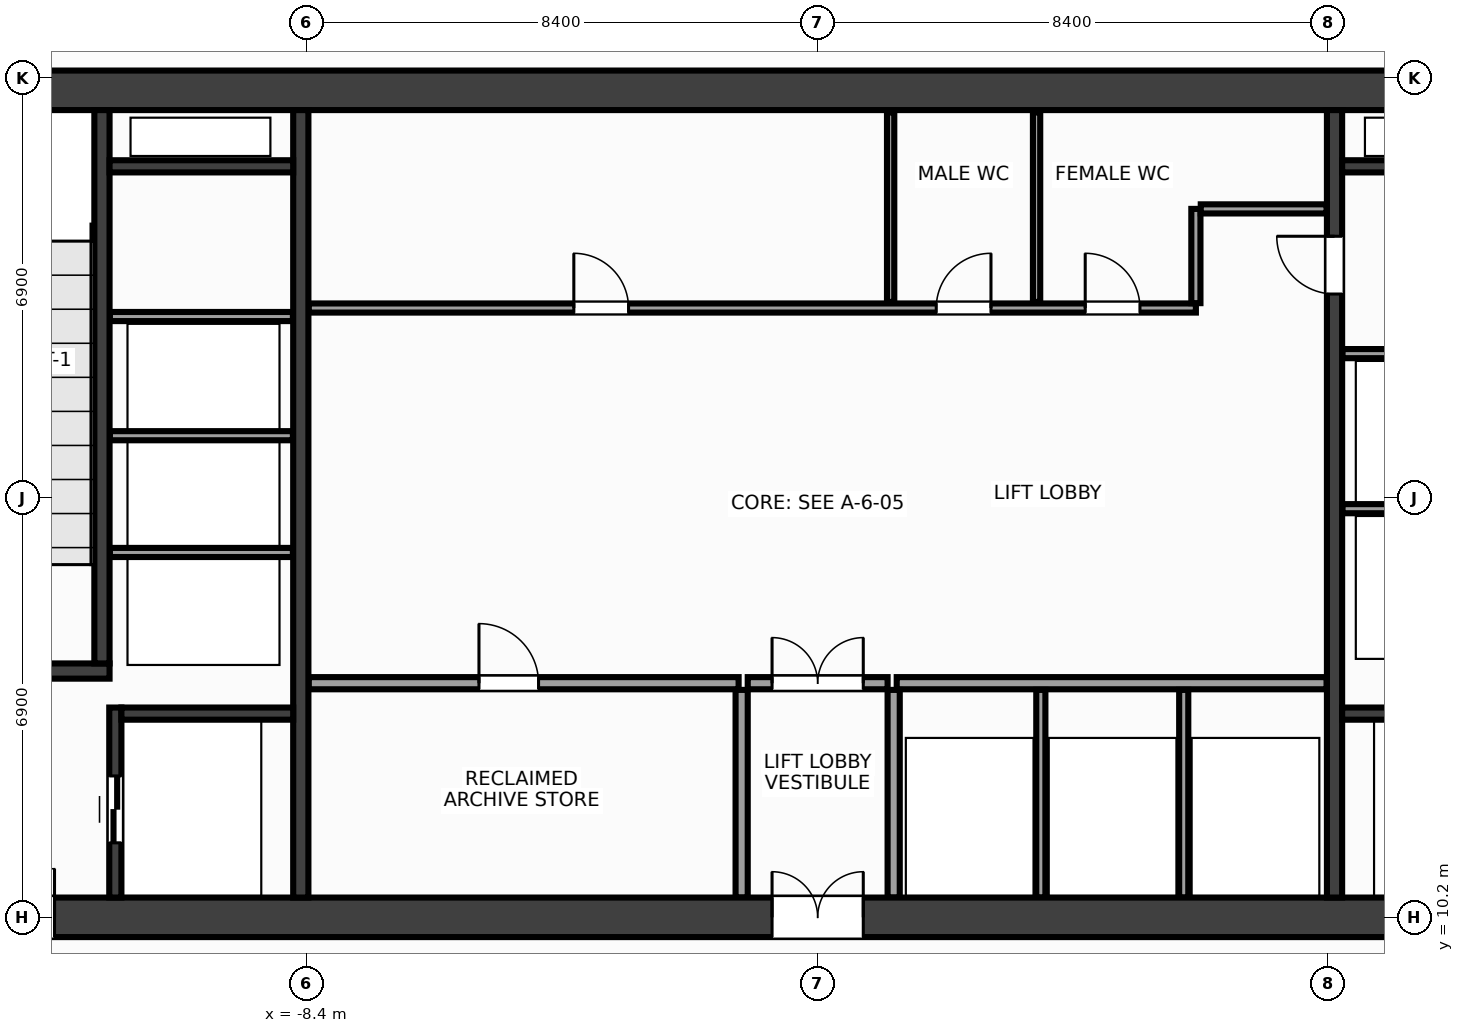
"""IFC4 building model, lengths in metres.
Left out: names, types, materials, properties, quantities, classifications, styles, units other than length and angle.
Written with IfcOpenShell. Run it as: python <this file> out.ifc"""

import sys

from ifc_helpers import new_model, si_unit, direction, frame, frame_2d, origin, place, context, subcontext, project, spatial, rectangle, extrude, source, transform, mapped, element, fill, save


model = new_model("IFC4")
c1 = context("Model", 3, precision=1e-05, world=origin(), true_north=direction((0.0, 1.0)))
c2 = subcontext(c1, "Body", "Model", "MODEL_VIEW")
j1 = project(units=[si_unit("LENGTHUNIT", "METRE"), si_unit("PLANEANGLEUNIT", "RADIAN")], contexts=[c1])
p1 = place(None, origin())
s1 = spatial("IfcSite", under=j1, at=p1, CompositionType="ELEMENT")
p2 = place(p1, origin())
s2 = spatial("IfcBuilding", under=s1, at=p2, CompositionType="ELEMENT")
p3 = place(p2, frame((0.0, 0.0, 189.2)))
s3 = spatial("IfcBuildingStorey", under=s2, at=p3, CompositionType="ELEMENT", Elevation=189.2)
m1 = source(origin(), c2, "Body", "SweptSolid", [
    extrude(rectangle(XDim=31.85, YDim=0.65, at=frame_2d((15.925, 0.0))), origin(), (0.0, 0.0, 1.0), 7.2),
])
p4 = place(p3, frame((-15.925, 23.8, 0.0), z_axis=(0.0, 0.0, 1.0), x_axis=(1.0, 0.0, 0.0)))
e1 = element("IfcWall", 1, at=p4, inside=s3, PredefinedType="SHEAR", context=c2, shape_type="MappedRepresentation", body=[
    mapped(m1, transform((0.0, 0.0, 0.0), x_axis=(1.0, 0.0, 0.0), y_axis=(0.0, 1.0, 0.0), z_axis=(0.0, 0.0, 1.0), scale=1.0)),
])
p5 = place(p3, frame((-15.925, 10.2, 0.0), z_axis=(0.0, 0.0, 1.0), x_axis=(1.0, 0.0, 0.0)))
e2 = element("IfcWall", 2, at=p5, inside=s3, PredefinedType="SHEAR", context=c2, shape_type="MappedRepresentation", body=[
    mapped(m1, transform((0.0, 0.0, 0.0), x_axis=(1.0, 0.0, 0.0), y_axis=(0.0, 1.0, 0.0), z_axis=(0.0, 0.0, 1.0), scale=1.0)),
])
p6 = place(p5, frame((1.775, 0.0, 0.0)))
e3 = element("IfcOpeningElement", 3, at=p6, cuts=e2, PredefinedType="OPENING", context=c2, shape_type="SweptSolid", body=[
    extrude(rectangle(XDim=1.6, YDim=2.15, at=frame_2d((0.8, 1.075))), frame((0.0, 0.337, 0.0), z_axis=(0.0, -1.0, 0.0), x_axis=(1.0, 0.0, 0.0)), (0.0, 0.0, 1.0), 0.674),
])
p7 = place(p5, frame((28.475, 0.0, 0.0)))
e4 = element("IfcOpeningElement", 4, at=p7, cuts=e2, PredefinedType="OPENING", context=c2, shape_type="SweptSolid", body=[
    extrude(rectangle(XDim=1.6, YDim=2.15, at=frame_2d((0.8, 1.075))), frame((0.0, 0.337, 0.0), z_axis=(0.0, -1.0, 0.0), x_axis=(1.0, 0.0, 0.0)), (0.0, 0.0, 1.0), 0.674),
])
p8 = place(p5, frame((15.175, 0.0, 0.0)))
e5 = element("IfcOpeningElement", 5, at=p8, cuts=e2, PredefinedType="OPENING", context=c2, shape_type="SweptSolid", body=[
    extrude(rectangle(XDim=1.5, YDim=2.2, at=frame_2d((0.75, 1.1))), frame((0.0, 0.337, 0.0), z_axis=(0.0, -1.0, 0.0), x_axis=(1.0, 0.0, 0.0)), (0.0, 0.0, 1.0), 0.674),
])
m2 = source(origin(), c2, "Body", "SweptSolid", [
    extrude(rectangle(XDim=12.95, YDim=0.25, at=frame_2d((6.475, 0.0))), origin(), (0.0, 0.0, 1.0), 7.2),
])
p9 = place(p3, frame((-8.5, 10.525, 0.0), z_axis=(0.0, 0.0, 1.0), x_axis=(0.0, 1.0, 0.0)))
e6 = element("IfcWall", 6, at=p9, inside=s3, PredefinedType="SHEAR", context=c2, shape_type="MappedRepresentation", body=[
    mapped(m2, transform((0.0, 0.0, 0.0), x_axis=(1.0, 0.0, 0.0), y_axis=(0.0, 1.0, 0.0), z_axis=(0.0, 0.0, 1.0), scale=1.0)),
])
p10 = place(p3, frame((8.5, 10.525, 0.0), z_axis=(0.0, 0.0, 1.0), x_axis=(0.0, 1.0, 0.0)))
e7 = element("IfcWall", 7, at=p10, inside=s3, PredefinedType="SHEAR", context=c2, shape_type="MappedRepresentation", body=[
    mapped(m2, transform((0.0, 0.0, 0.0), x_axis=(1.0, 0.0, 0.0), y_axis=(0.0, 1.0, 0.0), z_axis=(0.0, 0.0, 1.0), scale=1.0)),
])
p11 = place(p10, frame((9.925, 0.0, 0.0)))
e8 = element("IfcOpeningElement", 8, at=p11, cuts=e7, PredefinedType="OPENING", context=c2, shape_type="SweptSolid", body=[
    extrude(rectangle(XDim=0.95, YDim=2.15, at=frame_2d((0.475, 1.075))), frame((0.0, 0.137, 0.0), z_axis=(0.0, -1.0, 0.0), x_axis=(1.0, 0.0, 0.0)), (0.0, 0.0, 1.0), 0.274),
])
m3 = source(origin(), c2, "Body", "SweptSolid", [
    extrude(rectangle(XDim=3.63, YDim=0.25, at=frame_2d((1.815, 0.0))), origin(), (0.0, 0.0, 1.0), 7.2),
])
p12 = place(p3, frame((-15.275, 14.25, 0.0), z_axis=(0.0, 0.0, 1.0), x_axis=(1.0, 0.0, 0.0)))
e9 = element("IfcWall", 9, at=p12, inside=s3, PredefinedType="SHEAR", context=c2, shape_type="MappedRepresentation", body=[
    mapped(m3, transform((0.0, 0.0, 0.0), x_axis=(1.0, 0.0, 0.0), y_axis=(0.0, 1.0, 0.0), z_axis=(0.0, 0.0, 1.0), scale=1.0)),
])
p13 = place(p12, frame((0.95, 0.0, 0.0)))
e10 = element("IfcOpeningElement", 10, at=p13, cuts=e9, PredefinedType="OPENING", context=c2, shape_type="SweptSolid", body=[
    extrude(rectangle(XDim=1.6, YDim=2.15, at=frame_2d((0.8, 1.075))), frame((0.0, 0.137, 0.0), z_axis=(0.0, -1.0, 0.0), x_axis=(1.0, 0.0, 0.0)), (0.0, 0.0, 1.0), 0.274),
])
m4 = source(origin(), c2, "Body", "SweptSolid", [
    extrude(rectangle(XDim=9.1, YDim=0.25, at=frame_2d((4.55, 0.0))), origin(), (0.0, 0.0, 1.0), 7.2),
])
p14 = place(p3, frame((-11.77, 14.375, 0.0), z_axis=(0.0, 0.0, 1.0), x_axis=(0.0, 1.0, 0.0)))
e11 = element("IfcWall", 11, at=p14, inside=s3, PredefinedType="SHEAR", context=c2, shape_type="MappedRepresentation", body=[
    mapped(m4, transform((0.0, 0.0, 0.0), x_axis=(1.0, 0.0, 0.0), y_axis=(0.0, 1.0, 0.0), z_axis=(0.0, 0.0, 1.0), scale=1.0)),
])
m5 = source(origin(), c2, "Body", "SweptSolid", [
    extrude(rectangle(XDim=3.125, YDim=0.2, at=frame_2d((1.562, 0.0))), origin(), (0.0, 0.0, 1.0), 7.2),
])
p15 = place(p3, frame((-11.55, 10.525, 0.0), z_axis=(0.0, 0.0, 1.0), x_axis=(0.0, 1.0, 0.0)))
e12 = element("IfcWall", 12, at=p15, inside=s3, PredefinedType="SHEAR", context=c2, shape_type="MappedRepresentation", body=[
    mapped(m5, transform((0.0, 0.0, 0.0), x_axis=(1.0, 0.0, 0.0), y_axis=(0.0, 1.0, 0.0), z_axis=(0.0, 0.0, 1.0), scale=1.0)),
])
p16 = place(p15, frame((0.9, 0.0, 0.0)))
e13 = element("IfcOpeningElement", 13, at=p16, cuts=e12, PredefinedType="OPENING", context=c2, shape_type="SweptSolid", body=[
    extrude(rectangle(XDim=1.1, YDim=2.15, at=frame_2d((0.55, 1.075))), frame((0.0, 0.112, 0.0), z_axis=(0.0, -1.0, 0.0), x_axis=(1.0, 0.0, 0.0)), (0.0, 0.0, 1.0), 0.224),
])
m6 = source(origin(), c2, "Body", "SweptSolid", [
    extrude(rectangle(XDim=2.825, YDim=0.2, at=frame_2d((1.413, 0.0))), origin(), (0.0, 0.0, 1.0), 7.2),
])
for number, where, z_axis, x_axis in (
    (14, (-11.45, 13.55, 0.0), (0.0, 0.0, 1.0), (1.0, 0.0, 0.0)),
    (15, (8.625, 13.55, 0.0), (0.0, 0.0, 1.0), (1.0, 0.0, 0.0)),
):
    element("IfcWall", number, at=place(p3, frame(where, z_axis=z_axis, x_axis=x_axis)), inside=s3, PredefinedType="SHEAR", context=c2, shape_type="MappedRepresentation", body=[
        mapped(m6, transform((0.0, 0.0, 0.0), x_axis=(1.0, 0.0, 0.0), y_axis=(0.0, 1.0, 0.0), z_axis=(0.0, 0.0, 1.0), scale=1.0)),
    ])
m7 = source(origin(), c2, "Body", "SweptSolid", [
    extrude(rectangle(XDim=3.02, YDim=0.2, at=frame_2d((1.51, 0.0))), origin(), (0.0, 0.0, 1.0), 7.2),
])
for number, where, z_axis, x_axis in (
    (16, (-11.645, 22.55, 0.0), (0.0, 0.0, 1.0), (1.0, 0.0, 0.0)),
    (17, (8.625, 22.55, 0.0), (0.0, 0.0, 1.0), (1.0, 0.0, 0.0)),
):
    element("IfcWall", number, at=place(p3, frame(where, z_axis=z_axis, x_axis=x_axis)), inside=s3, PredefinedType="SHEAR", context=c2, shape_type="MappedRepresentation", body=[
        mapped(m7, transform((0.0, 0.0, 0.0), x_axis=(1.0, 0.0, 0.0), y_axis=(0.0, 1.0, 0.0), z_axis=(0.0, 0.0, 1.0), scale=1.0)),
    ])
m8 = source(origin(), c2, "Body", "SweptSolid", [
    extrude(rectangle(XDim=3.01, YDim=0.15, at=frame_2d((1.505, 0.0))), origin(), (0.0, 0.0, 1.0), 6.9),
])
for number, where, z_axis, x_axis in (
    (18, (-11.64, 16.2, 0.0), (0.0, 0.0, 1.0), (1.0, 0.0, 0.0)),
    (19, (-11.64, 18.12, 0.0), (0.0, 0.0, 1.0), (1.0, 0.0, 0.0)),
    (20, (-11.64, 20.08, 0.0), (0.0, 0.0, 1.0), (1.0, 0.0, 0.0)),
    (21, (8.63, 16.92, 0.0), (0.0, 0.0, 1.0), (1.0, 0.0, 0.0)),
    (22, (8.63, 19.47, 0.0), (0.0, 0.0, 1.0), (1.0, 0.0, 0.0)),
):
    element("IfcWall", number, at=place(p3, frame(where, z_axis=z_axis, x_axis=x_axis)), inside=s3, PredefinedType="PARTITIONING", context=c2, shape_type="MappedRepresentation", body=[
        mapped(m8, transform((0.0, 0.0, 0.0), x_axis=(1.0, 0.0, 0.0), y_axis=(0.0, 1.0, 0.0), z_axis=(0.0, 0.0, 1.0), scale=1.0)),
    ])
m9 = source(origin(), c2, "Body", "SweptSolid", [
    extrude(rectangle(XDim=7.07, YDim=0.2, at=frame_2d((3.535, 0.0))), origin(), (0.0, 0.0, 1.0), 6.9),
])
p17 = place(p3, frame((-8.37, 14.05, 0.0), z_axis=(0.0, 0.0, 1.0), x_axis=(1.0, 0.0, 0.0)))
e23 = element("IfcWall", 23, at=p17, inside=s3, PredefinedType="PARTITIONING", context=c2, shape_type="MappedRepresentation", body=[
    mapped(m9, transform((0.0, 0.0, 0.0), x_axis=(1.0, 0.0, 0.0), y_axis=(0.0, 1.0, 0.0), z_axis=(0.0, 0.0, 1.0), scale=1.0)),
])
p18 = place(p17, frame((2.8, 0.0, 0.0)))
e24 = element("IfcOpeningElement", 24, at=p18, cuts=e23, PredefinedType="OPENING", context=c2, shape_type="SweptSolid", body=[
    extrude(rectangle(XDim=0.98, YDim=2.15, at=frame_2d((0.49, 1.075))), frame((0.0, 0.112, 0.0), z_axis=(0.0, -1.0, 0.0), x_axis=(1.0, 0.0, 0.0)), (0.0, 0.0, 1.0), 0.224),
])
p19 = place(p3, frame((1.3, 14.05, 0.0), z_axis=(0.0, 0.0, 1.0), x_axis=(1.0, 0.0, 0.0)))
e25 = element("IfcWall", 25, at=p19, inside=s3, PredefinedType="PARTITIONING", context=c2, shape_type="MappedRepresentation", body=[
    mapped(m9, transform((0.0, 0.0, 0.0), x_axis=(1.0, 0.0, 0.0), y_axis=(0.0, 1.0, 0.0), z_axis=(0.0, 0.0, 1.0), scale=1.0)),
])
m10 = source(origin(), c2, "Body", "SweptSolid", [
    extrude(rectangle(XDim=3.415, YDim=0.2, at=frame_2d((1.708, 0.0))), origin(), (0.0, 0.0, 1.0), 6.9),
])
for number, where, z_axis, x_axis in (
    (26, (-1.25, 10.525, 0.0), (0.0, 0.0, 1.0), (0.0, 1.0, 0.0)),
    (27, (1.25, 10.525, 0.0), (0.0, 0.0, 1.0), (0.0, 1.0, 0.0)),
):
    element("IfcWall", number, at=place(p3, frame(where, z_axis=z_axis, x_axis=x_axis)), inside=s3, PredefinedType="PARTITIONING", context=c2, shape_type="MappedRepresentation", body=[
        mapped(m10, transform((0.0, 0.0, 0.0), x_axis=(1.0, 0.0, 0.0), y_axis=(0.0, 1.0, 0.0), z_axis=(0.0, 0.0, 1.0), scale=1.0)),
    ])
m11 = source(origin(), c2, "Body", "SweptSolid", [
    extrude(rectangle(XDim=2.3, YDim=0.2, at=frame_2d((1.15, 0.0))), origin(), (0.0, 0.0, 1.0), 6.9),
])
p20 = place(p3, frame((-1.15, 14.05, 0.0), z_axis=(0.0, 0.0, 1.0), x_axis=(1.0, 0.0, 0.0)))
e28 = element("IfcWall", 28, at=p20, inside=s3, PredefinedType="PARTITIONING", context=c2, shape_type="MappedRepresentation", body=[
    mapped(m11, transform((0.0, 0.0, 0.0), x_axis=(1.0, 0.0, 0.0), y_axis=(0.0, 1.0, 0.0), z_axis=(0.0, 0.0, 1.0), scale=1.0)),
])
p21 = place(p20, frame((0.4, 0.0, 0.0)))
e29 = element("IfcOpeningElement", 29, at=p21, cuts=e28, PredefinedType="OPENING", context=c2, shape_type="SweptSolid", body=[
    extrude(rectangle(XDim=1.5, YDim=2.2, at=frame_2d((0.75, 1.1))), frame((0.0, 0.112, 0.0), z_axis=(0.0, -1.0, 0.0), x_axis=(1.0, 0.0, 0.0)), (0.0, 0.0, 1.0), 0.224),
])
m12 = source(origin(), c2, "Body", "SweptSolid", [
    extrude(rectangle(XDim=14.59, YDim=0.15, at=frame_2d((7.295, 0.0))), origin(), (0.0, 0.0, 1.0), 6.9),
])
p22 = place(p3, frame((-8.37, 20.22, 0.0), z_axis=(0.0, 0.0, 1.0), x_axis=(1.0, 0.0, 0.0)))
e30 = element("IfcWall", 30, at=p22, inside=s3, PredefinedType="PARTITIONING", context=c2, shape_type="MappedRepresentation", body=[
    mapped(m12, transform((0.0, 0.0, 0.0), x_axis=(1.0, 0.0, 0.0), y_axis=(0.0, 1.0, 0.0), z_axis=(0.0, 0.0, 1.0), scale=1.0)),
])
p23 = place(p22, frame((4.36, 0.0, 0.0)))
e31 = element("IfcOpeningElement", 31, at=p23, cuts=e30, PredefinedType="OPENING", context=c2, shape_type="SweptSolid", body=[
    extrude(rectangle(XDim=0.9, YDim=2.15, at=frame_2d((0.45, 1.075))), frame((0.0, 0.087, 0.0), z_axis=(0.0, -1.0, 0.0), x_axis=(1.0, 0.0, 0.0)), (0.0, 0.0, 1.0), 0.174),
])
p24 = place(p22, frame((10.32, 0.0, 0.0)))
e32 = element("IfcOpeningElement", 32, at=p24, cuts=e30, PredefinedType="OPENING", context=c2, shape_type="SweptSolid", body=[
    extrude(rectangle(XDim=0.9, YDim=2.15, at=frame_2d((0.45, 1.075))), frame((0.0, 0.087, 0.0), z_axis=(0.0, -1.0, 0.0), x_axis=(1.0, 0.0, 0.0)), (0.0, 0.0, 1.0), 0.174),
])
p25 = place(p22, frame((12.77, 0.0, 0.0)))
e33 = element("IfcOpeningElement", 33, at=p25, cuts=e30, PredefinedType="OPENING", context=c2, shape_type="SweptSolid", body=[
    extrude(rectangle(XDim=0.9, YDim=2.15, at=frame_2d((0.45, 1.075))), frame((0.0, 0.087, 0.0), z_axis=(0.0, -1.0, 0.0), x_axis=(1.0, 0.0, 0.0)), (0.0, 0.0, 1.0), 0.174),
])
m13 = source(origin(), c2, "Body", "SweptSolid", [
    extrude(rectangle(XDim=1.55, YDim=0.15, at=frame_2d((0.775, 0.0))), origin(), (0.0, 0.0, 1.0), 6.9),
])
p26 = place(p3, frame((6.22, 20.3, 0.0), z_axis=(0.0, 0.0, 1.0), x_axis=(0.0, 1.0, 0.0)))
e34 = element("IfcWall", 34, at=p26, inside=s3, PredefinedType="PARTITIONING", context=c2, shape_type="MappedRepresentation", body=[
    mapped(m13, transform((0.0, 0.0, 0.0), x_axis=(1.0, 0.0, 0.0), y_axis=(0.0, 1.0, 0.0), z_axis=(0.0, 0.0, 1.0), scale=1.0)),
])
m14 = source(origin(), c2, "Body", "SweptSolid", [
    extrude(rectangle(XDim=2.07, YDim=0.15, at=frame_2d((1.035, 0.0))), origin(), (0.0, 0.0, 1.0), 6.9),
])
p27 = place(p3, frame((6.3, 21.85, 0.0), z_axis=(0.0, 0.0, 1.0), x_axis=(1.0, 0.0, 0.0)))
e35 = element("IfcWall", 35, at=p27, inside=s3, PredefinedType="PARTITIONING", context=c2, shape_type="MappedRepresentation", body=[
    mapped(m14, transform((0.0, 0.0, 0.0), x_axis=(1.0, 0.0, 0.0), y_axis=(0.0, 1.0, 0.0), z_axis=(0.0, 0.0, 1.0), scale=1.0)),
])
m15 = source(origin(), c2, "Body", "SweptSolid", [
    extrude(rectangle(XDim=3.415, YDim=0.15, at=frame_2d((1.708, 0.0))), origin(), (0.0, 0.0, 1.0), 6.9),
])
for number, where, z_axis, x_axis in (
    (36, (3.67, 10.525, 0.0), (0.0, 0.0, 1.0), (0.0, 1.0, 0.0)),
    (37, (6.02, 10.525, 0.0), (0.0, 0.0, 1.0), (0.0, 1.0, 0.0)),
):
    element("IfcWall", number, at=place(p3, frame(where, z_axis=z_axis, x_axis=x_axis)), inside=s3, PredefinedType="PARTITIONING", context=c2, shape_type="MappedRepresentation", body=[
        mapped(m15, transform((0.0, 0.0, 0.0), x_axis=(1.0, 0.0, 0.0), y_axis=(0.0, 1.0, 0.0), z_axis=(0.0, 0.0, 1.0), scale=1.0)),
    ])
m16 = source(origin(), c2, "Body", "SweptSolid", [
    extrude(rectangle(XDim=3.115, YDim=0.12, at=frame_2d((1.558, 0.0))), origin(), (0.0, 0.0, 1.0), 6.9),
])
for number, where, z_axis, x_axis in (
    (38, (1.2, 20.32, 0.0), (0.0, 0.0, 1.0), (0.0, 1.0, 0.0)),
    (39, (3.6, 20.32, 0.0), (0.0, 0.0, 1.0), (0.0, 1.0, 0.0)),
):
    element("IfcWall", number, at=place(p3, frame(where, z_axis=z_axis, x_axis=x_axis)), inside=s3, PredefinedType="PARTITIONING", context=c2, shape_type="MappedRepresentation", body=[
        mapped(m16, transform((0.0, 0.0, 0.0), x_axis=(1.0, 0.0, 0.0), y_axis=(0.0, 1.0, 0.0), z_axis=(0.0, 0.0, 1.0), scale=1.0)),
    ])
m17 = source(origin(), c2, "Body", "SweptSolid", [
    extrude(rectangle(XDim=1.6, YDim=2.15, at=frame_2d((0.8, 1.075))), frame((0.0, 0.025, 0.0), z_axis=(0.0, -1.0, 0.0), x_axis=(1.0, 0.0, 0.0)), (0.0, 0.0, 1.0), 0.05),
])
p28 = place(p6, origin())
e40 = element("IfcDoor", 40, at=p28, inside=s3, OperationType="DOUBLE_DOOR_SINGLE_SWING", PredefinedType="DOOR", context=c2, shape_type="MappedRepresentation", body=[
    mapped(m17, transform((0.0, 0.0, 0.0), x_axis=(1.0, 0.0, 0.0), y_axis=(0.0, 1.0, 0.0), z_axis=(0.0, 0.0, 1.0), scale=1.0)),
])
fill(e3, e40)
m18 = source(origin(), c2, "Body", "SweptSolid", [
    extrude(rectangle(XDim=1.1, YDim=2.15, at=frame_2d((0.55, 1.075))), frame((0.0, 0.025, 0.0), z_axis=(0.0, -1.0, 0.0), x_axis=(1.0, 0.0, 0.0)), (0.0, 0.0, 1.0), 0.05),
])
p29 = place(p16, origin())
e41 = element("IfcDoor", 41, at=p29, inside=s3, OperationType="DOUBLE_DOOR_SLIDING", PredefinedType="DOOR", context=c2, shape_type="MappedRepresentation", body=[
    mapped(m18, transform((0.0, 0.0, 0.0), x_axis=(1.0, 0.0, 0.0), y_axis=(0.0, 1.0, 0.0), z_axis=(0.0, 0.0, 1.0), scale=1.0)),
])
fill(e13, e41)
m19 = source(origin(), c2, "Body", "SweptSolid", [
    extrude(rectangle(XDim=0.95, YDim=2.15, at=frame_2d((0.475, 1.075))), frame((0.0, 0.025, 0.0), z_axis=(0.0, -1.0, 0.0), x_axis=(1.0, 0.0, 0.0)), (0.0, 0.0, 1.0), 0.05),
])
p30 = place(p11, origin())
e42 = element("IfcDoor", 42, at=p30, inside=s3, OperationType="SINGLE_SWING_RIGHT", PredefinedType="DOOR", context=c2, shape_type="MappedRepresentation", body=[
    mapped(m19, transform((0.0, 0.0, 0.0), x_axis=(1.0, 0.0, 0.0), y_axis=(0.0, 1.0, 0.0), z_axis=(0.0, 0.0, 1.0), scale=1.0)),
])
fill(e8, e42)
m20 = source(origin(), c2, "Body", "SweptSolid", [
    extrude(rectangle(XDim=0.98, YDim=2.15, at=frame_2d((0.49, 1.075))), frame((0.0, 0.025, 0.0), z_axis=(0.0, -1.0, 0.0), x_axis=(1.0, 0.0, 0.0)), (0.0, 0.0, 1.0), 0.05),
])
p31 = place(p18, origin())
e43 = element("IfcDoor", 43, at=p31, inside=s3, OperationType="SINGLE_SWING_LEFT", PredefinedType="DOOR", context=c2, shape_type="MappedRepresentation", body=[
    mapped(m20, transform((0.0, 0.0, 0.0), x_axis=(1.0, 0.0, 0.0), y_axis=(0.0, 1.0, 0.0), z_axis=(0.0, 0.0, 1.0), scale=1.0)),
])
fill(e24, e43)
m21 = source(origin(), c2, "Body", "SweptSolid", [
    extrude(rectangle(XDim=1.5, YDim=2.2, at=frame_2d((0.75, 1.1))), frame((0.0, 0.025, 0.0), z_axis=(0.0, -1.0, 0.0), x_axis=(1.0, 0.0, 0.0)), (0.0, 0.0, 1.0), 0.05),
])
p32 = place(p21, origin())
e44 = element("IfcDoor", 44, at=p32, inside=s3, OperationType="DOUBLE_DOOR_SINGLE_SWING", PredefinedType="DOOR", context=c2, shape_type="MappedRepresentation", body=[
    mapped(m21, transform((0.0, 0.0, 0.0), x_axis=(1.0, 0.0, 0.0), y_axis=(0.0, 1.0, 0.0), z_axis=(0.0, 0.0, 1.0), scale=1.0)),
])
fill(e29, e44)
p33 = place(p8, origin())
e45 = element("IfcDoor", 45, at=p33, inside=s3, OperationType="DOUBLE_DOOR_SINGLE_SWING", PredefinedType="DOOR", context=c2, shape_type="MappedRepresentation", body=[
    mapped(m21, transform((0.0, 0.0, 0.0), x_axis=(1.0, 0.0, 0.0), y_axis=(0.0, 1.0, 0.0), z_axis=(0.0, 0.0, 1.0), scale=1.0)),
])
fill(e5, e45)
m22 = source(origin(), c2, "Body", "SweptSolid", [
    extrude(rectangle(XDim=0.9, YDim=2.15, at=frame_2d((0.45, 1.075))), frame((0.0, 0.025, 0.0), z_axis=(0.0, -1.0, 0.0), x_axis=(1.0, 0.0, 0.0)), (0.0, 0.0, 1.0), 0.05),
])
p34 = place(p23, origin())
e46 = element("IfcDoor", 46, at=p34, inside=s3, OperationType="SINGLE_SWING_LEFT", PredefinedType="DOOR", context=c2, shape_type="MappedRepresentation", body=[
    mapped(m22, transform((0.0, 0.0, 0.0), x_axis=(1.0, 0.0, 0.0), y_axis=(0.0, 1.0, 0.0), z_axis=(0.0, 0.0, 1.0), scale=1.0)),
])
fill(e31, e46)
p35 = place(p24, origin())
e47 = element("IfcDoor", 47, at=p35, inside=s3, OperationType="SINGLE_SWING_RIGHT", PredefinedType="DOOR", context=c2, shape_type="MappedRepresentation", body=[
    mapped(m22, transform((0.0, 0.0, 0.0), x_axis=(1.0, 0.0, 0.0), y_axis=(0.0, 1.0, 0.0), z_axis=(0.0, 0.0, 1.0), scale=1.0)),
])
fill(e32, e47)
p36 = place(p25, origin())
e48 = element("IfcDoor", 48, at=p36, inside=s3, OperationType="SINGLE_SWING_LEFT", PredefinedType="DOOR", context=c2, shape_type="MappedRepresentation", body=[
    mapped(m22, transform((0.0, 0.0, 0.0), x_axis=(1.0, 0.0, 0.0), y_axis=(0.0, 1.0, 0.0), z_axis=(0.0, 0.0, 1.0), scale=1.0)),
])
fill(e33, e48)
save(model, sys.argv[1])
